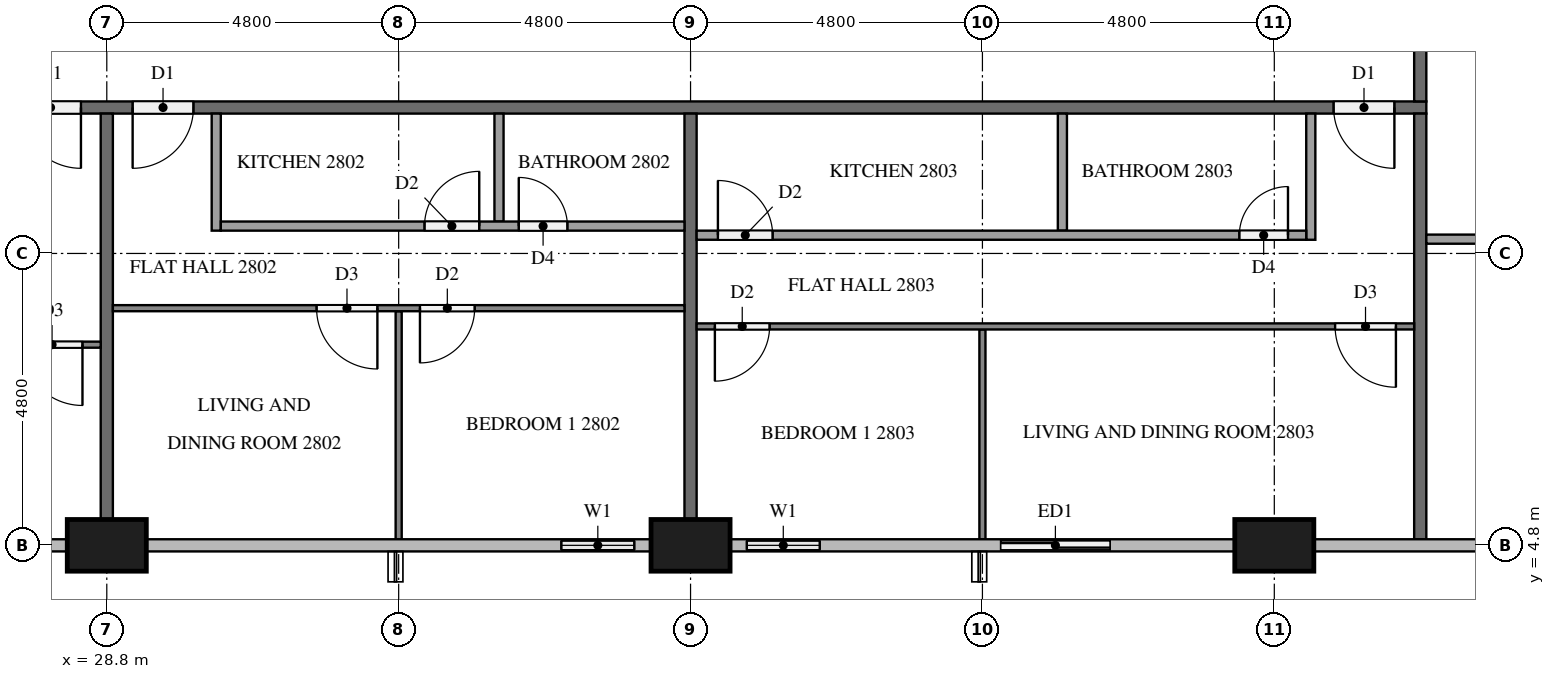
"""IFC4 building model, lengths in metres.
Left out: names, types, materials, properties, quantities, classifications, styles, units other than length and angle.
Written with IfcOpenShell. Run it as: python <this file> out.ifc"""

import sys

from ifc_helpers import new_model, si_unit, direction, frame, frame_2d, origin, origin_2d, place, context, subcontext, project, spatial, rectangle, extrude, element, fill, save


model = new_model("IFC4")
c1 = context("Model", 3, precision=1e-05, world=origin(), true_north=direction((0.0, 1.0)))
c2 = subcontext(c1, "Body", "Model", "MODEL_VIEW")
j1 = project(units=[si_unit("LENGTHUNIT", "METRE"), si_unit("PLANEANGLEUNIT", "RADIAN")], contexts=[c1])
p1 = place(None, origin())
s1 = spatial("IfcSite", under=j1, at=p1, CompositionType="ELEMENT")
p2 = place(p1, origin())
s2 = spatial("IfcBuilding", under=s1, at=p2, CompositionType="ELEMENT")
p3 = place(p2, frame((0.0, 0.0, 110.2)))
s3 = spatial("IfcBuildingStorey", under=s2, at=p3, CompositionType="ELEMENT", Elevation=110.2)
for number, where, z_axis, x_axis in (
    (1, (28.8, 4.8, 0.0), (0.0, 0.0, 1.0), (1.0, 0.0, 0.0)),
    (2, (38.4, 4.8, 0.0), (0.0, 0.0, 1.0), (1.0, 0.0, 0.0)),
    (3, (48.0, 4.8, 0.0), (0.0, 0.0, 1.0), (1.0, 0.0, 0.0)),
):
    element("IfcColumn", number, at=place(p3, frame(where, z_axis=z_axis, x_axis=x_axis)), inside=s3, PredefinedType="COLUMN", context=c2, shape_type="SweptSolid", body=[
        extrude(rectangle(XDim=1.3, YDim=0.85, at=origin_2d()), origin(), (0.0, 0.0, 1.0), 3.1),
    ])
p4 = place(p3, frame((36.0, 4.8, 0.0), z_axis=(0.0, 0.0, 1.0), x_axis=(1.0, 0.0, 0.0)))
e4 = element("IfcWall", 4, at=p4, inside=s3, PredefinedType="SOLIDWALL", context=c2, shape_type="SweptSolid", body=[
    extrude(rectangle(XDim=1.75, YDim=0.15, at=frame_2d((0.875, 0.0))), origin(), (0.0, 0.0, 1.0), 3.1),
])
p5 = place(p4, frame((0.275, 0.0, 0.9)))
e5 = element("IfcOpeningElement", 5, at=p5, cuts=e4, PredefinedType="OPENING", context=c2, shape_type="SweptSolid", body=[
    extrude(rectangle(XDim=1.2, YDim=1.4, at=frame_2d((0.6, 0.7))), frame((0.0, 0.085, 0.0), z_axis=(0.0, -1.0, 0.0), x_axis=(1.0, 0.0, 0.0)), (0.0, 0.0, 1.0), 0.17),
])
p6 = place(p3, frame((39.05, 4.8, 0.0), z_axis=(0.0, 0.0, 1.0), x_axis=(1.0, 0.0, 0.0)))
e6 = element("IfcWall", 6, at=p6, inside=s3, PredefinedType="SOLIDWALL", context=c2, shape_type="SweptSolid", body=[
    extrude(rectangle(XDim=1.75, YDim=0.15, at=frame_2d((0.875, 0.0))), origin(), (0.0, 0.0, 1.0), 3.1),
])
p7 = place(p6, frame((0.275, 0.0, 0.9)))
e7 = element("IfcOpeningElement", 7, at=p7, cuts=e6, PredefinedType="OPENING", context=c2, shape_type="SweptSolid", body=[
    extrude(rectangle(XDim=1.2, YDim=1.4, at=frame_2d((0.6, 0.7))), frame((0.0, 0.085, 0.0), z_axis=(0.0, -1.0, 0.0), x_axis=(1.0, 0.0, 0.0)), (0.0, 0.0, 1.0), 0.17),
])
p8 = place(p3, frame((43.2, 4.8, 0.0), z_axis=(0.0, 0.0, 1.0), x_axis=(1.0, 0.0, 0.0)))
e8 = element("IfcWall", 8, at=p8, inside=s3, PredefinedType="SOLIDWALL", context=c2, shape_type="SweptSolid", body=[
    extrude(rectangle(XDim=2.4, YDim=0.15, at=frame_2d((1.2, 0.0))), origin(), (0.0, 0.0, 1.0), 3.1),
])
p9 = place(p8, frame((0.3, 0.0, 0.0)))
e9 = element("IfcOpeningElement", 9, at=p9, cuts=e8, PredefinedType="OPENING", context=c2, shape_type="SweptSolid", body=[
    extrude(rectangle(XDim=1.8, YDim=2.4, at=frame_2d((0.9, 1.2))), frame((0.0, 0.085, 0.0), z_axis=(0.0, -1.0, 0.0), x_axis=(1.0, 0.0, 0.0)), (0.0, 0.0, 1.0), 0.17),
])
p10 = place(p3, frame((50.5, 12.0, 0.0), z_axis=(0.0, 0.0, 1.0), x_axis=(-1.0, 0.0, 0.0)))
e10 = element("IfcWall", 10, at=p10, inside=s3, PredefinedType="PARTITIONING", context=c2, shape_type="SweptSolid", body=[
    extrude(rectangle(XDim=38.6, YDim=0.2, at=frame_2d((19.3, 0.0))), origin(), (0.0, 0.0, 1.0), 3.1),
])
p11 = place(p10, frame((22.125, 0.0, 0.0)))
e11 = element("IfcOpeningElement", 11, at=p11, cuts=e10, PredefinedType="OPENING", context=c2, shape_type="SweptSolid", body=[
    extrude(rectangle(XDim=1.0, YDim=2.1, at=frame_2d((0.5, 1.05))), frame((0.0, 0.11, 0.0), z_axis=(0.0, -1.0, 0.0), x_axis=(1.0, 0.0, 0.0)), (0.0, 0.0, 1.0), 0.22),
])
p12 = place(p10, frame((20.275, 0.0, 0.0)))
e12 = element("IfcOpeningElement", 12, at=p12, cuts=e10, PredefinedType="OPENING", context=c2, shape_type="SweptSolid", body=[
    extrude(rectangle(XDim=1.0, YDim=2.1, at=frame_2d((0.5, 1.05))), frame((0.0, 0.11, 0.0), z_axis=(0.0, -1.0, 0.0), x_axis=(1.0, 0.0, 0.0)), (0.0, 0.0, 1.0), 0.22),
])
p13 = place(p10, frame((0.525, 0.0, 0.0)))
e13 = element("IfcOpeningElement", 13, at=p13, cuts=e10, PredefinedType="OPENING", context=c2, shape_type="SweptSolid", body=[
    extrude(rectangle(XDim=1.0, YDim=2.1, at=frame_2d((0.5, 1.05))), frame((0.0, 0.11, 0.0), z_axis=(0.0, -1.0, 0.0), x_axis=(1.0, 0.0, 0.0)), (0.0, 0.0, 1.0), 0.22),
])
p14 = place(p3, frame((50.4, 14.9, 0.0), z_axis=(0.0, 0.0, 1.0), x_axis=(0.0, -1.0, 0.0)))
e14 = element("IfcWall", 14, at=p14, inside=s3, PredefinedType="PARTITIONING", context=c2, shape_type="SweptSolid", body=[
    extrude(rectangle(XDim=2.8, YDim=0.2, at=frame_2d((1.4, 0.0))), origin(), (0.0, 0.0, 1.0), 3.1),
])
p15 = place(p14, frame((0.325, 0.0, 0.0)))
e15 = element("IfcOpeningElement", 15, at=p15, cuts=e14, PredefinedType="OPENING", context=c2, shape_type="SweptSolid", body=[
    extrude(rectangle(XDim=1.0, YDim=2.1, at=frame_2d((0.5, 1.05))), frame((0.0, 0.11, 0.0), z_axis=(0.0, -1.0, 0.0), x_axis=(1.0, 0.0, 0.0)), (0.0, 0.0, 1.0), 0.22),
])
for number, where, z_axis, x_axis in (
    (16, (28.8, 11.9, 0.0), (0.0, 0.0, 1.0), (0.0, -1.0, 0.0)),
    (17, (38.4, 11.9, 0.0), (0.0, 0.0, 1.0), (0.0, -1.0, 0.0)),
):
    element("IfcWall", number, at=place(p3, frame(where, z_axis=z_axis, x_axis=x_axis)), inside=s3, PredefinedType="PARTITIONING", context=c2, shape_type="SweptSolid", body=[
        extrude(rectangle(XDim=6.675, YDim=0.2, at=frame_2d((3.337, 0.0))), origin(), (0.0, 0.0, 1.0), 3.1),
    ])
p16 = place(p3, frame((50.4, 11.9, 0.0), z_axis=(0.0, 0.0, 1.0), x_axis=(0.0, -1.0, 0.0)))
e18 = element("IfcWall", 18, at=p16, inside=s3, PredefinedType="PARTITIONING", context=c2, shape_type="SweptSolid", body=[
    extrude(rectangle(XDim=7.0, YDim=0.2, at=frame_2d((3.5, 0.0))), origin(), (0.0, 0.0, 1.0), 3.1),
])
p17 = place(p3, frame((28.7, 8.1, 0.0), z_axis=(0.0, 0.0, 1.0), x_axis=(-1.0, 0.0, 0.0)))
e19 = element("IfcWall", 19, at=p17, inside=s3, PredefinedType="PARTITIONING", context=c2, shape_type="SweptSolid", body=[
    extrude(rectangle(XDim=16.6, YDim=0.1, at=frame_2d((8.3, 0.0))), origin(), (0.0, 0.0, 1.0), 3.1),
])
p18 = place(p17, frame((0.3, 0.0, 0.0)))
e20 = element("IfcOpeningElement", 20, at=p18, cuts=e19, PredefinedType="OPENING", context=c2, shape_type="SweptSolid", body=[
    extrude(rectangle(XDim=1.0, YDim=2.1, at=frame_2d((0.5, 1.05))), frame((0.0, 0.06, 0.0), z_axis=(0.0, -1.0, 0.0), x_axis=(1.0, 0.0, 0.0)), (0.0, 0.0, 1.0), 0.12),
])
p19 = place(p17, frame((10.65, 0.0, 0.0)))
e21 = element("IfcOpeningElement", 21, at=p19, cuts=e19, PredefinedType="OPENING", context=c2, shape_type="SweptSolid", body=[
    extrude(rectangle(XDim=0.9, YDim=2.1, at=frame_2d((0.45, 1.05))), frame((0.0, 0.06, 0.0), z_axis=(0.0, -1.0, 0.0), x_axis=(1.0, 0.0, 0.0)), (0.0, 0.0, 1.0), 0.12),
])
p20 = place(p17, frame((12.25, 0.0, 0.0)))
e22 = element("IfcOpeningElement", 22, at=p20, cuts=e19, PredefinedType="OPENING", context=c2, shape_type="SweptSolid", body=[
    extrude(rectangle(XDim=0.9, YDim=2.1, at=frame_2d((0.45, 1.05))), frame((0.0, 0.06, 0.0), z_axis=(0.0, -1.0, 0.0), x_axis=(1.0, 0.0, 0.0)), (0.0, 0.0, 1.0), 0.12),
])
p21 = place(p3, frame((33.6, 8.65, 0.0), z_axis=(0.0, 0.0, 1.0), x_axis=(0.0, -1.0, 0.0)))
e23 = element("IfcWall", 23, at=p21, inside=s3, PredefinedType="PARTITIONING", context=c2, shape_type="SweptSolid", body=[
    extrude(rectangle(XDim=3.75, YDim=0.1, at=frame_2d((1.875, 0.0))), origin(), (0.0, 0.0, 1.0), 3.1),
])
p22 = place(p3, frame((38.3, 8.7, 0.0), z_axis=(0.0, 0.0, 1.0), x_axis=(-1.0, 0.0, 0.0)))
e24 = element("IfcWall", 24, at=p22, inside=s3, PredefinedType="PARTITIONING", context=c2, shape_type="SweptSolid", body=[
    extrude(rectangle(XDim=9.4, YDim=0.1, at=frame_2d((4.7, 0.0))), origin(), (0.0, 0.0, 1.0), 3.1),
])
p23 = place(p22, frame((5.05, 0.0, 0.0)))
e25 = element("IfcOpeningElement", 25, at=p23, cuts=e24, PredefinedType="OPENING", context=c2, shape_type="SweptSolid", body=[
    extrude(rectangle(XDim=1.0, YDim=2.1, at=frame_2d((0.5, 1.05))), frame((0.0, 0.06, 0.0), z_axis=(0.0, -1.0, 0.0), x_axis=(1.0, 0.0, 0.0)), (0.0, 0.0, 1.0), 0.12),
])
p24 = place(p22, frame((3.45, 0.0, 0.0)))
e26 = element("IfcOpeningElement", 26, at=p24, cuts=e24, PredefinedType="OPENING", context=c2, shape_type="SweptSolid", body=[
    extrude(rectangle(XDim=0.9, YDim=2.1, at=frame_2d((0.45, 1.05))), frame((0.0, 0.06, 0.0), z_axis=(0.0, -1.0, 0.0), x_axis=(1.0, 0.0, 0.0)), (0.0, 0.0, 1.0), 0.12),
])
p25 = place(p3, frame((35.25, 11.9, 0.0), z_axis=(0.0, 0.0, 1.0), x_axis=(0.0, -1.0, 0.0)))
e27 = element("IfcWall", 27, at=p25, inside=s3, PredefinedType="PARTITIONING", context=c2, shape_type="SweptSolid", body=[
    extrude(rectangle(XDim=1.775, YDim=0.15, at=frame_2d((0.887, 0.0))), origin(), (0.0, 0.0, 1.0), 3.1),
])
p26 = place(p3, frame((30.6, 11.9, 0.0), z_axis=(0.0, 0.0, 1.0), x_axis=(0.0, -1.0, 0.0)))
e28 = element("IfcWall", 28, at=p26, inside=s3, PredefinedType="PARTITIONING", context=c2, shape_type="SweptSolid", body=[
    extrude(rectangle(XDim=1.925, YDim=0.15, at=frame_2d((0.962, 0.0))), origin(), (0.0, 0.0, 1.0), 3.1),
])
p27 = place(p3, frame((30.675, 10.05, 0.0), z_axis=(0.0, 0.0, 1.0), x_axis=(1.0, 0.0, 0.0)))
e29 = element("IfcWall", 29, at=p27, inside=s3, PredefinedType="PARTITIONING", context=c2, shape_type="SweptSolid", body=[
    extrude(rectangle(XDim=7.625, YDim=0.15, at=frame_2d((3.812, 0.0))), origin(), (0.0, 0.0, 1.0), 3.1),
])
p28 = place(p27, frame((3.35, 0.0, 0.0)))
e30 = element("IfcOpeningElement", 30, at=p28, cuts=e29, PredefinedType="OPENING", context=c2, shape_type="SweptSolid", body=[
    extrude(rectangle(XDim=0.9, YDim=2.1, at=frame_2d((0.45, 1.05))), frame((0.0, 0.085, 0.0), z_axis=(0.0, -1.0, 0.0), x_axis=(1.0, 0.0, 0.0)), (0.0, 0.0, 1.0), 0.17),
])
p29 = place(p27, frame((4.9, 0.0, 0.0)))
e31 = element("IfcOpeningElement", 31, at=p29, cuts=e29, PredefinedType="OPENING", context=c2, shape_type="SweptSolid", body=[
    extrude(rectangle(XDim=0.8, YDim=2.1, at=frame_2d((0.4, 1.05))), frame((0.0, 0.085, 0.0), z_axis=(0.0, -1.0, 0.0), x_axis=(1.0, 0.0, 0.0)), (0.0, 0.0, 1.0), 0.17),
])
p30 = place(p3, frame((43.2, 8.35, 0.0), z_axis=(0.0, 0.0, 1.0), x_axis=(0.0, -1.0, 0.0)))
e32 = element("IfcWall", 32, at=p30, inside=s3, PredefinedType="PARTITIONING", context=c2, shape_type="SweptSolid", body=[
    extrude(rectangle(XDim=3.45, YDim=0.1, at=frame_2d((1.725, 0.0))), origin(), (0.0, 0.0, 1.0), 3.1),
])
p31 = place(p3, frame((50.3, 8.4, 0.0), z_axis=(0.0, 0.0, 1.0), x_axis=(-1.0, 0.0, 0.0)))
e33 = element("IfcWall", 33, at=p31, inside=s3, PredefinedType="PARTITIONING", context=c2, shape_type="SweptSolid", body=[
    extrude(rectangle(XDim=11.8, YDim=0.1, at=frame_2d((5.9, 0.0))), origin(), (0.0, 0.0, 1.0), 3.1),
])
p32 = place(p31, frame((0.3, 0.0, 0.0)))
e34 = element("IfcOpeningElement", 34, at=p32, cuts=e33, PredefinedType="OPENING", context=c2, shape_type="SweptSolid", body=[
    extrude(rectangle(XDim=1.0, YDim=2.1, at=frame_2d((0.5, 1.05))), frame((0.0, 0.06, 0.0), z_axis=(0.0, -1.0, 0.0), x_axis=(1.0, 0.0, 0.0)), (0.0, 0.0, 1.0), 0.12),
])
p33 = place(p31, frame((10.6, 0.0, 0.0)))
e35 = element("IfcOpeningElement", 35, at=p33, cuts=e33, PredefinedType="OPENING", context=c2, shape_type="SweptSolid", body=[
    extrude(rectangle(XDim=0.9, YDim=2.1, at=frame_2d((0.45, 1.05))), frame((0.0, 0.06, 0.0), z_axis=(0.0, -1.0, 0.0), x_axis=(1.0, 0.0, 0.0)), (0.0, 0.0, 1.0), 0.12),
])
p34 = place(p3, frame((44.515, 11.9, 0.0), z_axis=(0.0, 0.0, 1.0), x_axis=(0.0, -1.0, 0.0)))
e36 = element("IfcWall", 36, at=p34, inside=s3, PredefinedType="PARTITIONING", context=c2, shape_type="SweptSolid", body=[
    extrude(rectangle(XDim=1.925, YDim=0.15, at=frame_2d((0.962, 0.0))), origin(), (0.0, 0.0, 1.0), 3.1),
])
p35 = place(p3, frame((48.6, 11.9, 0.0), z_axis=(0.0, 0.0, 1.0), x_axis=(0.0, -1.0, 0.0)))
e37 = element("IfcWall", 37, at=p35, inside=s3, PredefinedType="PARTITIONING", context=c2, shape_type="SweptSolid", body=[
    extrude(rectangle(XDim=2.075, YDim=0.15, at=frame_2d((1.038, 0.0))), origin(), (0.0, 0.0, 1.0), 3.1),
])
p36 = place(p3, frame((38.5, 9.9, 0.0), z_axis=(0.0, 0.0, 1.0), x_axis=(1.0, 0.0, 0.0)))
e38 = element("IfcWall", 38, at=p36, inside=s3, PredefinedType="PARTITIONING", context=c2, shape_type="SweptSolid", body=[
    extrude(rectangle(XDim=10.025, YDim=0.15, at=frame_2d((5.012, 0.0))), origin(), (0.0, 0.0, 1.0), 3.1),
])
p37 = place(p36, frame((8.925, 0.0, 0.0)))
e39 = element("IfcOpeningElement", 39, at=p37, cuts=e38, PredefinedType="OPENING", context=c2, shape_type="SweptSolid", body=[
    extrude(rectangle(XDim=0.8, YDim=2.1, at=frame_2d((0.4, 1.05))), frame((0.0, 0.085, 0.0), z_axis=(0.0, -1.0, 0.0), x_axis=(1.0, 0.0, 0.0)), (0.0, 0.0, 1.0), 0.17),
])
p38 = place(p36, frame((0.35, 0.0, 0.0)))
e40 = element("IfcOpeningElement", 40, at=p38, cuts=e38, PredefinedType="OPENING", context=c2, shape_type="SweptSolid", body=[
    extrude(rectangle(XDim=0.9, YDim=2.1, at=frame_2d((0.45, 1.05))), frame((0.0, 0.085, 0.0), z_axis=(0.0, -1.0, 0.0), x_axis=(1.0, 0.0, 0.0)), (0.0, 0.0, 1.0), 0.17),
])
p39 = place(p3, frame((50.5, 9.835, 0.0), z_axis=(0.0, 0.0, 1.0), x_axis=(1.0, 0.0, 0.0)))
e41 = element("IfcWall", 41, at=p39, inside=s3, PredefinedType="PARTITIONING", context=c2, shape_type="SweptSolid", body=[
    extrude(rectangle(XDim=4.475, YDim=0.15, at=frame_2d((2.238, 0.0))), origin(), (0.0, 0.0, 1.0), 3.1),
])
p40 = place(p5, origin())
e42 = element("IfcWindow", 42, at=p40, inside=s3, PartitioningType="SINGLE_PANEL", PredefinedType="WINDOW", context=c2, shape_type="SweptSolid", body=[
    extrude(rectangle(XDim=1.2, YDim=1.4, at=frame_2d((0.6, 0.7))), frame((0.0, 0.03, 0.0), z_axis=(0.0, -1.0, 0.0), x_axis=(1.0, 0.0, 0.0)), (0.0, 0.0, 1.0), 0.06),
])
fill(e5, e42)
p41 = place(p7, origin())
e43 = element("IfcWindow", 43, at=p41, inside=s3, PartitioningType="SINGLE_PANEL", PredefinedType="WINDOW", context=c2, shape_type="SweptSolid", body=[
    extrude(rectangle(XDim=1.2, YDim=1.4, at=frame_2d((0.6, 0.7))), frame((0.0, 0.03, 0.0), z_axis=(0.0, -1.0, 0.0), x_axis=(1.0, 0.0, 0.0)), (0.0, 0.0, 1.0), 0.06),
])
fill(e7, e43)
p42 = place(p9, origin())
e44 = element("IfcDoor", 44, at=p42, inside=s3, OperationType="SLIDING_TO_RIGHT", PredefinedType="DOOR", context=c2, shape_type="SweptSolid", body=[
    extrude(rectangle(XDim=1.8, YDim=2.4, at=frame_2d((0.9, 1.2))), frame((0.0, 0.025, 0.0), z_axis=(0.0, -1.0, 0.0), x_axis=(1.0, 0.0, 0.0)), (0.0, 0.0, 1.0), 0.05),
])
fill(e9, e44)
p43 = place(p11, origin())
e45 = element("IfcDoor", 45, at=p43, inside=s3, OperationType="SINGLE_SWING_LEFT", PredefinedType="DOOR", context=c2, shape_type="SweptSolid", body=[
    extrude(rectangle(XDim=1.0, YDim=2.1, at=frame_2d((0.5, 1.05))), frame((0.0, 0.025, 0.0), z_axis=(0.0, -1.0, 0.0), x_axis=(1.0, 0.0, 0.0)), (0.0, 0.0, 1.0), 0.05),
])
fill(e11, e45)
p44 = place(p12, origin())
e46 = element("IfcDoor", 46, at=p44, inside=s3, OperationType="SINGLE_SWING_RIGHT", PredefinedType="DOOR", context=c2, shape_type="SweptSolid", body=[
    extrude(rectangle(XDim=1.0, YDim=2.1, at=frame_2d((0.5, 1.05))), frame((0.0, 0.025, 0.0), z_axis=(0.0, -1.0, 0.0), x_axis=(1.0, 0.0, 0.0)), (0.0, 0.0, 1.0), 0.05),
])
fill(e12, e46)
p45 = place(p13, origin())
e47 = element("IfcDoor", 47, at=p45, inside=s3, OperationType="SINGLE_SWING_LEFT", PredefinedType="DOOR", context=c2, shape_type="SweptSolid", body=[
    extrude(rectangle(XDim=1.0, YDim=2.1, at=frame_2d((0.5, 1.05))), frame((0.0, 0.025, 0.0), z_axis=(0.0, -1.0, 0.0), x_axis=(1.0, 0.0, 0.0)), (0.0, 0.0, 1.0), 0.05),
])
fill(e13, e47)
p46 = place(p18, origin())
e48 = element("IfcDoor", 48, at=p46, inside=s3, OperationType="SINGLE_SWING_LEFT", PredefinedType="DOOR", context=c2, shape_type="SweptSolid", body=[
    extrude(rectangle(XDim=1.0, YDim=2.1, at=frame_2d((0.5, 1.05))), frame((0.0, 0.025, 0.0), z_axis=(0.0, -1.0, 0.0), x_axis=(1.0, 0.0, 0.0)), (0.0, 0.0, 1.0), 0.05),
])
fill(e20, e48)
p47 = place(p23, origin())
e49 = element("IfcDoor", 49, at=p47, inside=s3, OperationType="SINGLE_SWING_LEFT", PredefinedType="DOOR", context=c2, shape_type="SweptSolid", body=[
    extrude(rectangle(XDim=1.0, YDim=2.1, at=frame_2d((0.5, 1.05))), frame((0.0, 0.025, 0.0), z_axis=(0.0, -1.0, 0.0), x_axis=(1.0, 0.0, 0.0)), (0.0, 0.0, 1.0), 0.05),
])
fill(e25, e49)
p48 = place(p24, origin())
e50 = element("IfcDoor", 50, at=p48, inside=s3, OperationType="SINGLE_SWING_RIGHT", PredefinedType="DOOR", context=c2, shape_type="SweptSolid", body=[
    extrude(rectangle(XDim=0.9, YDim=2.1, at=frame_2d((0.45, 1.05))), frame((0.0, 0.025, 0.0), z_axis=(0.0, -1.0, 0.0), x_axis=(1.0, 0.0, 0.0)), (0.0, 0.0, 1.0), 0.05),
])
fill(e26, e50)
p49 = place(p28, origin())
e51 = element("IfcDoor", 51, at=p49, inside=s3, OperationType="SINGLE_SWING_RIGHT", PredefinedType="DOOR", context=c2, shape_type="SweptSolid", body=[
    extrude(rectangle(XDim=0.9, YDim=2.1, at=frame_2d((0.45, 1.05))), frame((0.0, 0.025, 0.0), z_axis=(0.0, -1.0, 0.0), x_axis=(1.0, 0.0, 0.0)), (0.0, 0.0, 1.0), 0.05),
])
fill(e30, e51)
p50 = place(p29, origin())
e52 = element("IfcDoor", 52, at=p50, inside=s3, OperationType="SINGLE_SWING_LEFT", PredefinedType="DOOR", context=c2, shape_type="SweptSolid", body=[
    extrude(rectangle(XDim=0.8, YDim=2.1, at=frame_2d((0.4, 1.05))), frame((0.0, 0.025, 0.0), z_axis=(0.0, -1.0, 0.0), x_axis=(1.0, 0.0, 0.0)), (0.0, 0.0, 1.0), 0.05),
])
fill(e31, e52)
p51 = place(p32, origin())
e53 = element("IfcDoor", 53, at=p51, inside=s3, OperationType="SINGLE_SWING_LEFT", PredefinedType="DOOR", context=c2, shape_type="SweptSolid", body=[
    extrude(rectangle(XDim=1.0, YDim=2.1, at=frame_2d((0.5, 1.05))), frame((0.0, 0.025, 0.0), z_axis=(0.0, -1.0, 0.0), x_axis=(1.0, 0.0, 0.0)), (0.0, 0.0, 1.0), 0.05),
])
fill(e34, e53)
p52 = place(p33, origin())
e54 = element("IfcDoor", 54, at=p52, inside=s3, OperationType="SINGLE_SWING_RIGHT", PredefinedType="DOOR", context=c2, shape_type="SweptSolid", body=[
    extrude(rectangle(XDim=0.9, YDim=2.1, at=frame_2d((0.45, 1.05))), frame((0.0, 0.025, 0.0), z_axis=(0.0, -1.0, 0.0), x_axis=(1.0, 0.0, 0.0)), (0.0, 0.0, 1.0), 0.05),
])
fill(e35, e54)
p53 = place(p37, origin())
e55 = element("IfcDoor", 55, at=p53, inside=s3, OperationType="SINGLE_SWING_RIGHT", PredefinedType="DOOR", context=c2, shape_type="SweptSolid", body=[
    extrude(rectangle(XDim=0.8, YDim=2.1, at=frame_2d((0.4, 1.05))), frame((0.0, 0.025, 0.0), z_axis=(0.0, -1.0, 0.0), x_axis=(1.0, 0.0, 0.0)), (0.0, 0.0, 1.0), 0.05),
])
fill(e39, e55)
p54 = place(p38, origin())
e56 = element("IfcDoor", 56, at=p54, inside=s3, OperationType="SINGLE_SWING_LEFT", PredefinedType="DOOR", context=c2, shape_type="SweptSolid", body=[
    extrude(rectangle(XDim=0.9, YDim=2.1, at=frame_2d((0.45, 1.05))), frame((0.0, 0.025, 0.0), z_axis=(0.0, -1.0, 0.0), x_axis=(1.0, 0.0, 0.0)), (0.0, 0.0, 1.0), 0.05),
])
fill(e40, e56)
save(model, sys.argv[1])
